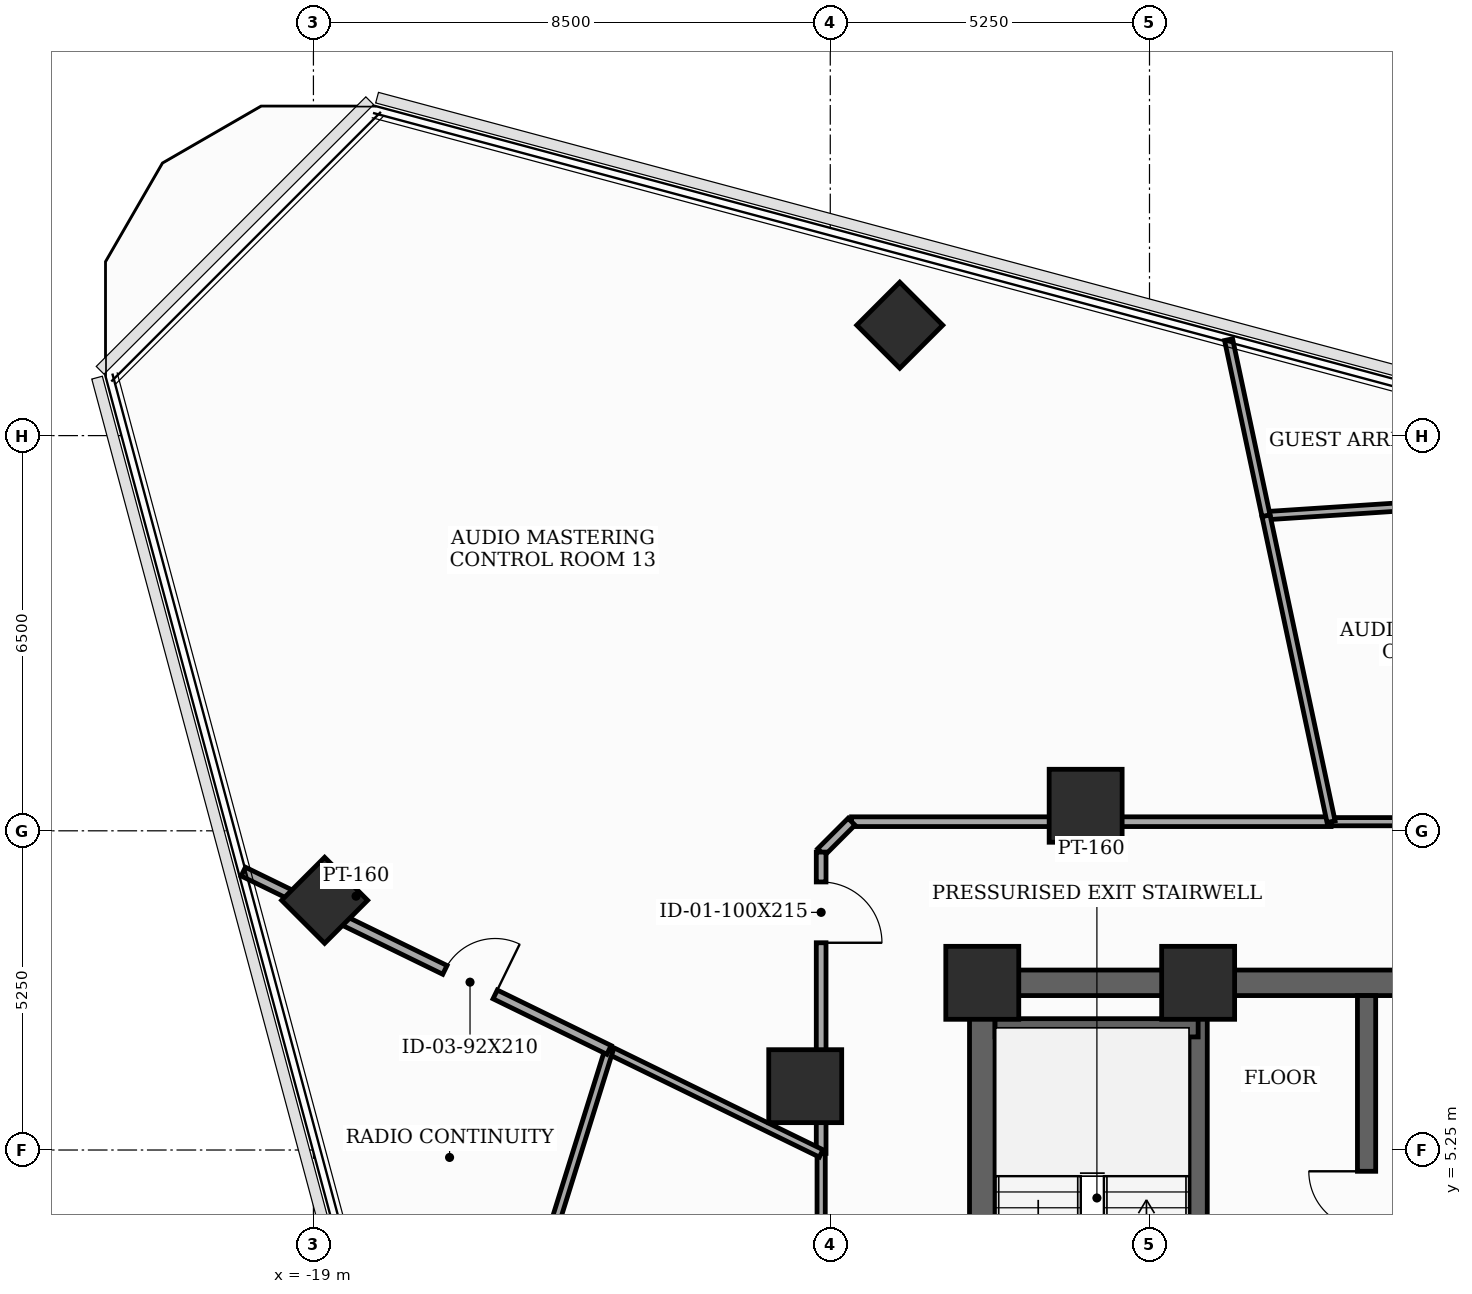
"""IFC4 building model, lengths in metres.
Left out: names, types, materials, properties, quantities, classifications, styles, units other than length and angle.
Written with IfcOpenShell. Run it as: python <this file> out.ifc"""

import sys

from ifc_helpers import new_model, si_unit, direction, frame, frame_2d, origin, origin_2d, place, context, subcontext, project, spatial, rectangle, extrude, element, fill, save


model = new_model("IFC4")
c1 = context("Model", 3, precision=1e-05, world=origin(), true_north=direction((0.0, 1.0)))
c2 = subcontext(c1, "Body", "Model", "MODEL_VIEW")
j1 = project(units=[si_unit("LENGTHUNIT", "METRE"), si_unit("PLANEANGLEUNIT", "RADIAN")], contexts=[c1])
p1 = place(None, origin())
s1 = spatial("IfcSite", under=j1, at=p1, CompositionType="ELEMENT")
p2 = place(p1, origin())
s2 = spatial("IfcBuilding", under=s1, at=p2, CompositionType="ELEMENT")
p3 = place(p2, frame((0.0, 0.0, 184.2)))
s3 = spatial("IfcBuildingStorey", under=s2, at=p3, CompositionType="ELEMENT", Elevation=184.2)
for number, where, z_axis, x_axis in (
    (1, (-4.45, 8.0, 0.0), (0.0, 0.0, 1.0), (1.0, 0.0, 0.0)),
    (2, (-8.0, 8.0, 0.0), (0.0, 0.0, 1.0), (1.0, 0.0, 0.0)),
    (3, (-6.3, 10.912, 0.0), (0.0, 0.0, 1.0), (1.0, 0.0, 0.0)),
    (4, (-10.912, 6.3, 0.0), (0.0, 0.0, 1.0), (1.0, 0.0, 0.0)),
):
    element("IfcColumn", number, at=place(p3, frame(where, z_axis=z_axis, x_axis=x_axis)), inside=s3, PredefinedType="COLUMN", context=c2, shape_type="SweptSolid", body=[
        extrude(rectangle(XDim=1.2, YDim=1.2, at=origin_2d()), origin(), (0.0, 0.0, 1.0), 3.7),
    ])
for number, where, z_axis, x_axis in (
    (5, (-9.357, 18.816, 0.0), (0.0, 0.0, 1.0), (0.707, 0.707, 0.0)),
    (6, (-18.816, 9.357, 0.0), (0.0, 0.0, 1.0), (0.707, 0.707, 0.0)),
):
    element("IfcColumn", number, at=place(p3, frame(where, z_axis=z_axis, x_axis=x_axis)), inside=s3, PredefinedType="COLUMN", context=c2, shape_type="SweptSolid", body=[
        extrude(rectangle(XDim=1.0, YDim=1.0, at=origin_2d()), origin(), (0.0, 0.0, 1.0), 3.7),
    ])
p4 = place(p3, frame((-8.0, -8.0, 0.0), z_axis=(0.0, 0.0, 1.0), x_axis=(0.0, 1.0, 0.0)))
e7 = element("IfcWall", 7, at=p4, inside=s3, PredefinedType="SHEAR", context=c2, shape_type="SweptSolid", body=[
    extrude(rectangle(XDim=16.0, YDim=0.42, at=frame_2d((8.0, 0.0))), origin(), (0.0, 0.0, 1.0), 3.5),
])
p5 = place(p4, frame((0.761, 0.0, 0.0)))
e8 = element("IfcOpeningElement", 8, at=p5, cuts=e7, PredefinedType="OPENING", context=c2, shape_type="SweptSolid", body=[
    extrude(rectangle(XDim=0.85, YDim=2.02, at=frame_2d((0.425, 1.01))), frame((0.0, 0.22, 0.0), z_axis=(0.0, -1.0, 0.0), x_axis=(1.0, 0.0, 0.0)), (0.0, 0.0, 1.0), 0.44),
])
p6 = place(p4, frame((5.35, 0.0, 0.0)))
e9 = element("IfcOpeningElement", 9, at=p6, cuts=e7, PredefinedType="OPENING", context=c2, shape_type="SweptSolid", body=[
    extrude(rectangle(XDim=1.05, YDim=2.15, at=frame_2d((0.525, 1.075))), frame((0.0, 0.22, 0.0), z_axis=(0.0, -1.0, 0.0), x_axis=(1.0, 0.0, 0.0)), (0.0, 0.0, 1.0), 0.44),
])
p7 = place(p3, frame((-8.0, 8.0, 0.0), z_axis=(0.0, 0.0, 1.0), x_axis=(1.0, 0.0, 0.0)))
e10 = element("IfcWall", 10, at=p7, inside=s3, PredefinedType="SHEAR", context=c2, shape_type="SweptSolid", body=[
    extrude(rectangle(XDim=16.0, YDim=0.42, at=frame_2d((8.0, 0.0))), origin(), (0.0, 0.0, 1.0), 3.5),
])
p8 = place(p7, frame((7.1, 0.0, 0.0)))
e11 = element("IfcOpeningElement", 11, at=p8, cuts=e10, PredefinedType="OPENING", context=c2, shape_type="SweptSolid", body=[
    extrude(rectangle(XDim=1.8, YDim=2.15, at=frame_2d((0.9, 1.075))), frame((0.0, 0.22, 0.0), z_axis=(0.0, -1.0, 0.0), x_axis=(1.0, 0.0, 0.0)), (0.0, 0.0, 1.0), 0.44),
])
p9 = place(p3, frame((-4.45, -7.79, 0.0), z_axis=(0.0, 0.0, 1.0), x_axis=(0.0, 1.0, 0.0)))
e12 = element("IfcWall", 12, at=p9, inside=s3, PredefinedType="SHEAR", context=c2, shape_type="SweptSolid", body=[
    extrude(rectangle(XDim=15.58, YDim=0.3, at=frame_2d((7.79, 0.0))), origin(), (0.0, 0.0, 1.0), 3.5),
])
p10 = place(p3, frame((-7.79, 7.26, 0.0), z_axis=(0.0, 0.0, 1.0), x_axis=(1.0, 0.0, 0.0)))
e13 = element("IfcWall", 13, at=p10, inside=s3, PredefinedType="SHEAR", context=c2, shape_type="SweptSolid", body=[
    extrude(rectangle(XDim=3.34, YDim=0.3, at=frame_2d((1.67, 0.0))), origin(), (0.0, 0.0, 1.0), 3.5),
])
p11 = place(p3, frame((-1.68, -4.85, 0.0), z_axis=(0.0, 0.0, 1.0), x_axis=(0.0, 1.0, 0.0)))
e14 = element("IfcWall", 14, at=p11, inside=s3, PredefinedType="SHEAR", context=c2, shape_type="SweptSolid", body=[
    extrude(rectangle(XDim=12.64, YDim=0.3, at=frame_2d((6.32, 0.0))), origin(), (0.0, 0.0, 1.0), 3.5),
])
p12 = place(p11, frame((2.6, 0.0, 0.0)))
e15 = element("IfcOpeningElement", 15, at=p12, cuts=e14, PredefinedType="OPENING", context=c2, shape_type="SweptSolid", body=[
    extrude(rectangle(XDim=0.95, YDim=2.1, at=frame_2d((0.475, 1.05))), frame((0.0, 0.16, 0.0), z_axis=(0.0, -1.0, 0.0), x_axis=(1.0, 0.0, 0.0)), (0.0, 0.0, 1.0), 0.32),
])
p13 = place(p11, frame((8.8, 0.0, 0.0)))
e16 = element("IfcOpeningElement", 16, at=p13, cuts=e14, PredefinedType="OPENING", context=c2, shape_type="SweptSolid", body=[
    extrude(rectangle(XDim=0.95, YDim=2.1, at=frame_2d((0.475, 1.05))), frame((0.0, 0.16, 0.0), z_axis=(0.0, -1.0, 0.0), x_axis=(1.0, 0.0, 0.0)), (0.0, 0.0, 1.0), 0.32),
])
p14 = place(p3, frame((-10.65, 5.194, 0.0), z_axis=(0.0, 0.0, 1.0), x_axis=(0.0, -1.0, 0.0)))
e17 = element("IfcWall", 17, at=p14, inside=s3, PredefinedType="PARTITIONING", context=c2, shape_type="SweptSolid", body=[
    extrude(rectangle(XDim=11.849, YDim=0.135, at=frame_2d((5.925, 0.0))), origin(), (0.0, 0.0, 1.0), 2.885),
])
p15 = place(p14, frame((6.871, 0.0, 0.0)))
e18 = element("IfcOpeningElement", 18, at=p15, cuts=e17, PredefinedType="OPENING", context=c2, shape_type="SweptSolid", body=[
    extrude(rectangle(XDim=0.95, YDim=2.1, at=frame_2d((0.475, 1.05))), frame((0.0, 0.077, 0.0), z_axis=(0.0, -1.0, 0.0), x_axis=(1.0, 0.0, 0.0)), (0.0, 0.0, 1.0), 0.155),
])
p16 = place(p3, frame((4.742, 10.65, 0.0), z_axis=(0.0, 0.0, 1.0), x_axis=(-1.0, 0.0, 0.0)))
e19 = element("IfcWall", 19, at=p16, inside=s3, PredefinedType="PARTITIONING", context=c2, shape_type="SweptSolid", body=[
    extrude(rectangle(XDim=7.006, YDim=0.135, at=frame_2d((3.503, 0.0))), origin(), (0.0, 0.0, 1.0), 2.885),
])
p17 = place(p16, frame((3.028, 0.0, 0.0)))
e20 = element("IfcOpeningElement", 20, at=p17, cuts=e19, PredefinedType="OPENING", context=c2, shape_type="SweptSolid", body=[
    extrude(rectangle(XDim=0.95, YDim=2.1, at=frame_2d((0.475, 1.05))), frame((0.0, 0.077, 0.0), z_axis=(0.0, -1.0, 0.0), x_axis=(1.0, 0.0, 0.0)), (0.0, 0.0, 1.0), 0.155),
])
p18 = place(p3, frame((-2.264, 10.65, 0.0), z_axis=(0.0, 0.0, 1.0), x_axis=(-1.0, 0.0, 0.0)))
e21 = element("IfcWall", 21, at=p18, inside=s3, PredefinedType="PARTITIONING", context=c2, shape_type="SweptSolid", body=[
    extrude(rectangle(XDim=7.886, YDim=0.16, at=frame_2d((3.943, 0.0))), origin(), (0.0, 0.0, 1.0), 2.885),
])
p19 = place(p3, frame((-10.15, 10.65, 0.0), z_axis=(0.0, 0.0, 1.0), x_axis=(-0.707106781187, -0.707106781187, 0.0)))
e22 = element("IfcWall", 22, at=p19, inside=s3, PredefinedType="PARTITIONING", context=c2, shape_type="SweptSolid", body=[
    extrude(rectangle(XDim=0.707, YDim=0.16, at=frame_2d((0.354, 0.0))), origin(), (0.0, 0.0, 1.0), 3.5),
])
p20 = place(p3, frame((-10.65, 10.15, 0.0), z_axis=(0.0, 0.0, 1.0), x_axis=(0.0, -1.0, 0.0)))
e23 = element("IfcWall", 23, at=p20, inside=s3, PredefinedType="PARTITIONING", context=c2, shape_type="SweptSolid", body=[
    extrude(rectangle(XDim=4.956, YDim=0.16, at=frame_2d((2.478, 0.0))), origin(), (0.0, 0.0, 1.0), 2.885),
])
p21 = place(p20, frame((0.491, 0.0, 0.0)))
e24 = element("IfcOpeningElement", 24, at=p21, cuts=e23, PredefinedType="OPENING", context=c2, shape_type="SweptSolid", body=[
    extrude(rectangle(XDim=1.0, YDim=2.15, at=frame_2d((0.5, 1.075))), frame((0.0, 0.09, 0.0), z_axis=(0.0, -1.0, 0.0), x_axis=(1.0, 0.0, 0.0)), (0.0, 0.0, 1.0), 0.18),
])
p22 = place(p3, frame((-10.65, 5.194, 0.0), z_axis=(0.0, 0.0, 1.0), x_axis=(-0.898773885441, 0.438412480261, 0.0)))
e25 = element("IfcWall", 25, at=p22, inside=s3, PredefinedType="PARTITIONING", context=c2, shape_type="SweptSolid", body=[
    extrude(rectangle(XDim=3.882, YDim=0.135, at=frame_2d((1.941, 0.0))), origin(), (0.0, 0.0, 1.0), 2.885),
])
p23 = place(p3, frame((-14.139, 6.896, 0.0), z_axis=(0.0, 0.0, 1.0), x_axis=(-0.298099863076, -0.954534688544, 0.0)))
e26 = element("IfcWall", 26, at=p23, inside=s3, PredefinedType="PARTITIONING", context=c2, shape_type="SweptSolid", body=[
    extrude(rectangle(XDim=5.16, YDim=0.135, at=frame_2d((2.58, 0.0))), origin(), (0.0, 0.0, 1.0), 3.5),
])
p24 = place(p3, frame((1.683, 16.012, 0.0), z_axis=(0.0, 0.0, 1.0), x_axis=(-0.997858663881, -0.065407086143, 0.0)))
e27 = element("IfcWall", 27, at=p24, inside=s3, PredefinedType="PARTITIONING", context=c2, shape_type="SweptSolid", body=[
    extrude(rectangle(XDim=5.028, YDim=0.135, at=frame_2d((2.514, 0.0))), origin(), (0.0, 0.0, 1.0), 2.985),
])
p25 = place(p3, frame((-3.334, 15.683, 0.0), z_axis=(0.0, 0.0, 1.0), x_axis=(0.207954085813, -0.978138588439, 0.0)))
e28 = element("IfcWall", 28, at=p25, inside=s3, PredefinedType="PARTITIONING", context=c2, shape_type="SweptSolid", body=[
    extrude(rectangle(XDim=5.146, YDim=0.135, at=frame_2d((2.573, 0.0))), origin(), (0.0, 0.0, 1.0), 2.885),
])
p26 = place(p3, frame((-3.949, 18.578, 0.0), z_axis=(0.0, 0.0, 1.0), x_axis=(0.207951490347, -0.978139140236, 0.0)))
e29 = element("IfcWall", 29, at=p26, inside=s3, PredefinedType="PARTITIONING", context=c2, shape_type="SweptSolid", body=[
    extrude(rectangle(XDim=2.96, YDim=0.135, at=frame_2d((1.48, 0.0))), origin(), (0.0, 0.0, 1.0), 2.985),
])
p27 = place(p3, frame((-20.154, 9.829, 0.0), z_axis=(0.0, 0.0, 1.0), x_axis=(0.898812268895, -0.43833378296, 0.0)))
e30 = element("IfcWall", 30, at=p27, inside=s3, PredefinedType="PARTITIONING", context=c2, shape_type="SweptSolid", body=[
    extrude(rectangle(XDim=6.692, YDim=0.16, at=frame_2d((3.346, 0.0))), origin(), (0.0, 0.0, 1.0), 2.985),
])
p28 = place(p27, frame((3.689, 0.0, 0.0)))
e31 = element("IfcOpeningElement", 31, at=p28, cuts=e30, PredefinedType="OPENING", context=c2, shape_type="SweptSolid", body=[
    extrude(rectangle(XDim=0.92, YDim=2.1, at=frame_2d((0.46, 1.05))), frame((0.0, 0.09, 0.0), z_axis=(0.0, -1.0, 0.0), x_axis=(1.0, 0.0, 0.0)), (0.0, 0.0, 1.0), 0.18),
])
p29 = place(p13, origin())
e32 = element("IfcDoor", 32, at=p29, inside=s3, OperationType="SINGLE_SWING_RIGHT", PredefinedType="DOOR", context=c2, shape_type="SweptSolid", body=[
    extrude(rectangle(XDim=0.95, YDim=2.1, at=frame_2d((0.475, 1.05))), frame((0.0, 0.025, 0.0), z_axis=(0.0, -1.0, 0.0), x_axis=(1.0, 0.0, 0.0)), (0.0, 0.0, 1.0), 0.05),
])
fill(e16, e32)
p30 = place(p21, origin())
e33 = element("IfcDoor", 33, at=p30, inside=s3, OperationType="SINGLE_SWING_RIGHT", PredefinedType="DOOR", context=c2, shape_type="SweptSolid", body=[
    extrude(rectangle(XDim=1.0, YDim=2.15, at=frame_2d((0.5, 1.075))), frame((0.0, 0.025, 0.0), z_axis=(0.0, -1.0, 0.0), x_axis=(1.0, 0.0, 0.0)), (0.0, 0.0, 1.0), 0.05),
])
fill(e24, e33)
p31 = place(p28, origin())
e34 = element("IfcDoor", 34, at=p31, inside=s3, OperationType="SINGLE_SWING_RIGHT", PredefinedType="DOOR", context=c2, shape_type="SweptSolid", body=[
    extrude(rectangle(XDim=0.92, YDim=2.1, at=frame_2d((0.46, 1.05))), frame((0.0, 0.025, 0.0), z_axis=(0.0, -1.0, 0.0), x_axis=(1.0, 0.0, 0.0)), (0.0, 0.0, 1.0), 0.05),
])
fill(e31, e34)
save(model, sys.argv[1])
